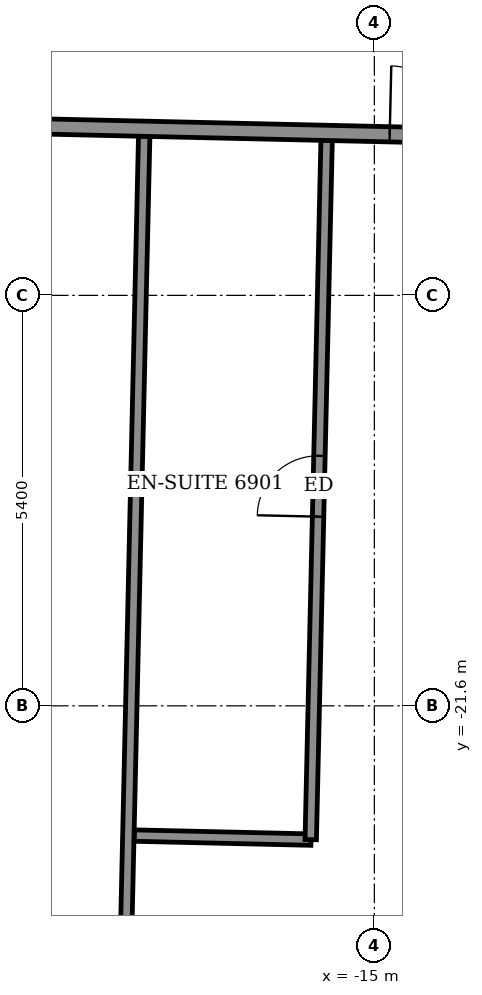
"""IFC4 building model, lengths in metres.
Left out: names, types, materials, properties, quantities, classifications, styles, units other than length and angle.
Written with IfcOpenShell. Run it as: python <this file> out.ifc"""

import sys

from ifc_helpers import new_model, si_unit, direction, frame, frame_2d, origin, place, context, subcontext, project, spatial, rectangle, extrude, element, fill, save


model = new_model("IFC4")
c1 = context("Model", 3, precision=1e-05, world=origin(), true_north=direction((0.0, 1.0)))
c2 = subcontext(c1, "Body", "Model", "MODEL_VIEW")
j1 = project(units=[si_unit("LENGTHUNIT", "METRE"), si_unit("PLANEANGLEUNIT", "RADIAN")], contexts=[c1])
p1 = place(None, origin())
s1 = spatial("IfcSite", under=j1, at=p1, CompositionType="ELEMENT")
p2 = place(p1, origin())
s2 = spatial("IfcBuilding", under=s1, at=p2, CompositionType="ELEMENT")
p3 = place(p2, frame((0.0, 0.0, 271.7)))
s3 = spatial("IfcBuildingStorey", under=s2, at=p3, CompositionType="ELEMENT", Elevation=271.7)
p4 = place(p3, frame((-18.309, -26.505, 0.0), z_axis=(0.0, 0.0, 1.0), x_axis=(0.022661475803, 0.999743195783, 0.0)))
e1 = element("IfcWall", 1, at=p4, inside=s3, PredefinedType="PARTITIONING", context=c2, shape_type="SweptSolid", body=[
    extrude(rectangle(XDim=12.4, YDim=0.15, at=frame_2d((6.2, 0.0))), origin(), (0.0, 0.0, 1.0), 2.55),
])
p5 = place(p3, frame((-18.157, -23.307, 0.0), z_axis=(0.0, 0.0, 1.0), x_axis=(0.999737862264, -0.022895561926, 0.0)))
e2 = element("IfcWall", 2, at=p5, inside=s3, PredefinedType="PARTITIONING", context=c2, shape_type="SweptSolid", body=[
    extrude(rectangle(XDim=2.324, YDim=0.15, at=frame_2d((1.162, 0.0))), origin(), (0.0, 0.0, 1.0), 3.05),
])
p6 = place(p3, frame((-15.837, -23.36, 0.0), z_axis=(0.0, 0.0, 1.0), x_axis=(0.02271477479, 0.999741986218, 0.0)))
e3 = element("IfcWall", 3, at=p6, inside=s3, PredefinedType="PARTITIONING", context=c2, shape_type="SweptSolid", body=[
    extrude(rectangle(XDim=9.2, YDim=0.15, at=frame_2d((4.6, 0.0))), origin(), (0.0, 0.0, 1.0), 3.05),
])
p7 = place(p6, frame((4.25, 0.0, 0.0)))
e4 = element("IfcOpeningElement", 4, at=p7, cuts=e3, PredefinedType="OPENING", context=c2, shape_type="SweptSolid", body=[
    extrude(rectangle(XDim=0.8, YDim=2.1, at=frame_2d((0.4, 1.05))), frame((0.0, 0.085, 0.0), z_axis=(0.0, -1.0, 0.0), x_axis=(1.0, 0.0, 0.0)), (0.0, 0.0, 1.0), 0.17),
])
p8 = place(p3, frame((-25.12, -13.847, 0.0), z_axis=(0.0, 0.0, 1.0), x_axis=(0.999742852445, -0.022676617578, 0.0)))
e5 = element("IfcWall", 5, at=p8, inside=s3, PredefinedType="PARTITIONING", context=c2, shape_type="SweptSolid", body=[
    extrude(rectangle(XDim=52.873, YDim=0.2, at=frame_2d((26.437, 0.0))), origin(), (0.0, 0.0, 1.0), 3.05),
])
p9 = place(p8, frame((2.43, 0.0, 0.0)))
e6 = element("IfcOpeningElement", 6, at=p9, cuts=e5, PredefinedType="OPENING", context=c2, shape_type="SweptSolid", body=[
    extrude(rectangle(XDim=1.0, YDim=2.1, at=frame_2d((0.5, 1.05))), frame((0.0, 0.11, 0.0), z_axis=(0.0, -1.0, 0.0), x_axis=(1.0, 0.0, 0.0)), (0.0, 0.0, 1.0), 0.22),
])
p10 = place(p8, frame((10.325, 0.0, 0.0)))
e7 = element("IfcOpeningElement", 7, at=p10, cuts=e5, PredefinedType="OPENING", context=c2, shape_type="SweptSolid", body=[
    extrude(rectangle(XDim=0.9, YDim=2.1, at=frame_2d((0.45, 1.05))), frame((0.0, 0.11, 0.0), z_axis=(0.0, -1.0, 0.0), x_axis=(1.0, 0.0, 0.0)), (0.0, 0.0, 1.0), 0.22),
])
p11 = place(p8, frame((12.575, 0.0, 0.0)))
e8 = element("IfcOpeningElement", 8, at=p11, cuts=e5, PredefinedType="OPENING", context=c2, shape_type="SweptSolid", body=[
    extrude(rectangle(XDim=0.9, YDim=2.1, at=frame_2d((0.45, 1.05))), frame((0.0, 0.11, 0.0), z_axis=(0.0, -1.0, 0.0), x_axis=(1.0, 0.0, 0.0)), (0.0, 0.0, 1.0), 0.22),
])
p12 = place(p8, frame((19.45, 0.0, 0.0)))
e9 = element("IfcOpeningElement", 9, at=p12, cuts=e5, PredefinedType="OPENING", context=c2, shape_type="SweptSolid", body=[
    extrude(rectangle(XDim=0.9, YDim=2.1, at=frame_2d((0.45, 1.05))), frame((0.0, 0.11, 0.0), z_axis=(0.0, -1.0, 0.0), x_axis=(1.0, 0.0, 0.0)), (0.0, 0.0, 1.0), 0.22),
])
p13 = place(p8, frame((21.625, 0.0, 0.0)))
e10 = element("IfcOpeningElement", 10, at=p13, cuts=e5, PredefinedType="OPENING", context=c2, shape_type="SweptSolid", body=[
    extrude(rectangle(XDim=0.9, YDim=2.1, at=frame_2d((0.45, 1.05))), frame((0.0, 0.11, 0.0), z_axis=(0.0, -1.0, 0.0), x_axis=(1.0, 0.0, 0.0)), (0.0, 0.0, 1.0), 0.22),
])
p14 = place(p8, frame((28.575, 0.0, 0.0)))
e11 = element("IfcOpeningElement", 11, at=p14, cuts=e5, PredefinedType="OPENING", context=c2, shape_type="SweptSolid", body=[
    extrude(rectangle(XDim=0.9, YDim=2.1, at=frame_2d((0.45, 1.05))), frame((0.0, 0.11, 0.0), z_axis=(0.0, -1.0, 0.0), x_axis=(1.0, 0.0, 0.0)), (0.0, 0.0, 1.0), 0.22),
])
p15 = place(p8, frame((30.875, 0.0, 0.0)))
e12 = element("IfcOpeningElement", 12, at=p15, cuts=e5, PredefinedType="OPENING", context=c2, shape_type="SweptSolid", body=[
    extrude(rectangle(XDim=0.9, YDim=2.1, at=frame_2d((0.45, 1.05))), frame((0.0, 0.11, 0.0), z_axis=(0.0, -1.0, 0.0), x_axis=(1.0, 0.0, 0.0)), (0.0, 0.0, 1.0), 0.22),
])
p16 = place(p8, frame((38.175, 0.0, 0.0)))
e13 = element("IfcOpeningElement", 13, at=p16, cuts=e5, PredefinedType="OPENING", context=c2, shape_type="SweptSolid", body=[
    extrude(rectangle(XDim=0.9, YDim=2.1, at=frame_2d((0.45, 1.05))), frame((0.0, 0.11, 0.0), z_axis=(0.0, -1.0, 0.0), x_axis=(1.0, 0.0, 0.0)), (0.0, 0.0, 1.0), 0.22),
])
p17 = place(p8, frame((40.675, 0.0, 0.0)))
e14 = element("IfcOpeningElement", 14, at=p17, cuts=e5, PredefinedType="OPENING", context=c2, shape_type="SweptSolid", body=[
    extrude(rectangle(XDim=0.9, YDim=2.1, at=frame_2d((0.45, 1.05))), frame((0.0, 0.11, 0.0), z_axis=(0.0, -1.0, 0.0), x_axis=(1.0, 0.0, 0.0)), (0.0, 0.0, 1.0), 0.22),
])
p18 = place(p8, frame((50.561, 0.0, 0.0)))
e15 = element("IfcOpeningElement", 15, at=p18, cuts=e5, PredefinedType="OPENING", context=c2, shape_type="SweptSolid", body=[
    extrude(rectangle(XDim=1.0, YDim=2.1, at=frame_2d((0.5, 1.05))), frame((0.0, 0.11, 0.0), z_axis=(0.0, -1.0, 0.0), x_axis=(1.0, 0.0, 0.0)), (0.0, 0.0, 1.0), 0.22),
])
p19 = place(p8, frame((45.6, 0.0, 0.0)))
e16 = element("IfcOpeningElement", 16, at=p19, cuts=e5, PredefinedType="OPENING", context=c2, shape_type="SweptSolid", body=[
    extrude(rectangle(XDim=0.9, YDim=2.1, at=frame_2d((0.45, 1.05))), frame((0.0, 0.11, 0.0), z_axis=(0.0, -1.0, 0.0), x_axis=(1.0, 0.0, 0.0)), (0.0, 0.0, 1.0), 0.22),
])
p20 = place(p10, origin())
e17 = element("IfcDoor", 17, at=p20, inside=s3, OperationType="SINGLE_SWING_LEFT", PredefinedType="DOOR", context=c2, shape_type="SweptSolid", body=[
    extrude(rectangle(XDim=0.9, YDim=2.1, at=frame_2d((0.45, 1.05))), frame((0.0, 0.025, 0.0), z_axis=(0.0, -1.0, 0.0), x_axis=(1.0, 0.0, 0.0)), (0.0, 0.0, 1.0), 0.05),
])
fill(e7, e17)
p21 = place(p7, origin())
e18 = element("IfcDoor", 18, at=p21, inside=s3, OperationType="SINGLE_SWING_LEFT", PredefinedType="DOOR", context=c2, shape_type="SweptSolid", body=[
    extrude(rectangle(XDim=0.8, YDim=2.1, at=frame_2d((0.4, 1.05))), frame((0.0, 0.025, 0.0), z_axis=(0.0, -1.0, 0.0), x_axis=(1.0, 0.0, 0.0)), (0.0, 0.0, 1.0), 0.05),
])
fill(e4, e18)
save(model, sys.argv[1])
